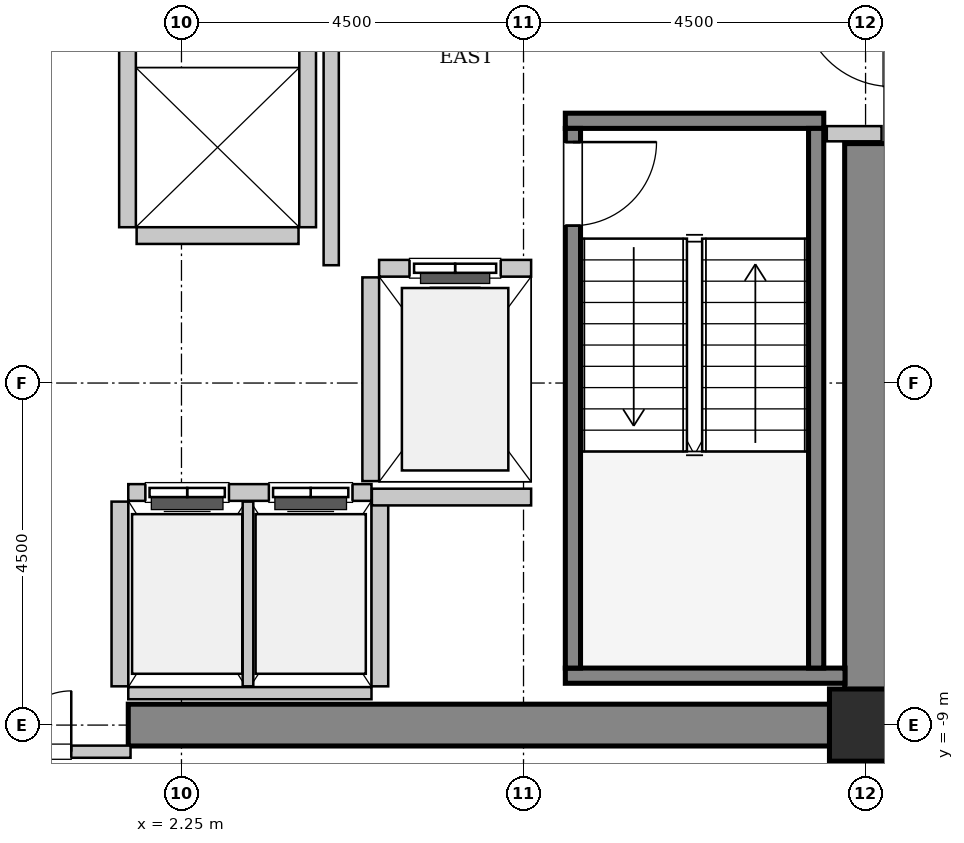
"""IFC4 building model, lengths in metres.
Left out: names, types, materials, properties, quantities, classifications, styles, units other than length and angle.
Written with IfcOpenShell. Run it as: python <this file> out.ifc"""

import sys

from ifc_helpers import new_model, si_unit, direction, frame, frame_2d, origin, origin_2d, place, context, subcontext, project, spatial, rectangle, hollow_rectangle, extrude, source, transform, mapped, element, fill, save


model = new_model("IFC4")
c1 = context("Model", 3, precision=1e-05, world=origin(), true_north=direction((0.0, 1.0)))
c2 = subcontext(c1, "Body", "Model", "MODEL_VIEW")
j1 = project(units=[si_unit("LENGTHUNIT", "METRE"), si_unit("PLANEANGLEUNIT", "RADIAN")], contexts=[c1])
p1 = place(None, origin())
s1 = spatial("IfcSite", under=j1, at=p1, CompositionType="ELEMENT")
p2 = place(p1, origin())
s2 = spatial("IfcBuilding", under=s1, at=p2, CompositionType="ELEMENT")
p3 = place(p2, frame((0.0, 0.0, 179.2)))
s3 = spatial("IfcBuildingStorey", under=s2, at=p3, CompositionType="ELEMENT", Elevation=179.2)
m1 = source(origin(), c2, "Body", "SweptSolid", [
    extrude(rectangle(XDim=9.975, YDim=0.55, at=frame_2d((4.987, 0.0))), origin(), (0.0, 0.0, 1.0), 3.8),
])
p4 = place(p3, frame((1.55, -9.0, 0.0), z_axis=(0.0, 0.0, 1.0), x_axis=(1.0, 0.0, 0.0)))
e1 = element("IfcWall", 1, at=p4, inside=s3, PredefinedType="SHEAR", context=c2, shape_type="MappedRepresentation", body=[
    mapped(m1, transform((0.0, 0.0, 0.0), x_axis=(1.0, 0.0, 0.0), y_axis=(0.0, 1.0, 0.0), z_axis=(0.0, 0.0, 1.0), scale=1.0)),
])
m2 = source(origin(), c2, "Body", "SweptSolid", [
    extrude(rectangle(XDim=7.375, YDim=0.55, at=frame_2d((3.688, 0.0))), origin(), (0.0, 0.0, 1.0), 3.8),
])
p5 = place(p3, frame((11.25, -8.725, 0.0), z_axis=(0.0, 0.0, 1.0), x_axis=(0.0, 1.0, 0.0)))
e2 = element("IfcWall", 2, at=p5, inside=s3, PredefinedType="SHEAR", context=c2, shape_type="MappedRepresentation", body=[
    mapped(m2, transform((0.0, 0.0, 0.0), x_axis=(1.0, 0.0, 0.0), y_axis=(0.0, 1.0, 0.0), z_axis=(0.0, 0.0, 1.0), scale=1.0)),
])
m3 = source(origin(), c2, "Body", "SweptSolid", [
    extrude(hollow_rectangle(XDim=0.95, YDim=0.95, WallThickness=0.045, InnerFilletRadius=0.045, OuterFilletRadius=0.09, at=origin_2d()), origin(), (0.0, 0.0, 1.0), 3.8),
])
p6 = place(p3, frame((11.25, -9.0, 0.0), z_axis=(0.0, 0.0, 1.0), x_axis=(1.0, 0.0, 0.0)))
e3 = element("IfcColumn", 3, at=p6, inside=s3, PredefinedType="COLUMN", context=c2, shape_type="MappedRepresentation", body=[
    mapped(m3, transform((0.0, 0.0, 0.0), x_axis=(1.0, 0.0, 0.0), y_axis=(0.0, 1.0, 0.0), z_axis=(0.0, 0.0, 1.0), scale=1.0)),
])
m4 = source(origin(), c2, "Body", "SweptSolid", [
    extrude(rectangle(XDim=3.4, YDim=0.2, at=frame_2d((1.7, 0.0))), origin(), (0.0, 0.0, 1.0), 3.8),
])
p7 = place(p3, frame((7.3, -1.05, 0.0), z_axis=(0.0, 0.0, 1.0), x_axis=(1.0, 0.0, 0.0)))
e4 = element("IfcWall", 4, at=p7, inside=s3, PredefinedType="SOLIDWALL", context=c2, shape_type="MappedRepresentation", body=[
    mapped(m4, transform((0.0, 0.0, 0.0), x_axis=(1.0, 0.0, 0.0), y_axis=(0.0, 1.0, 0.0), z_axis=(0.0, 0.0, 1.0), scale=1.0)),
])
m5 = source(origin(), c2, "Body", "SweptSolid", [
    extrude(rectangle(XDim=3.68, YDim=0.2, at=frame_2d((1.84, 0.0))), origin(), (0.0, 0.0, 1.0), 3.8),
])
p8 = place(p3, frame((7.3, -8.35, 0.0), z_axis=(0.0, 0.0, 1.0), x_axis=(1.0, 0.0, 0.0)))
e5 = element("IfcWall", 5, at=p8, inside=s3, PredefinedType="SOLIDWALL", context=c2, shape_type="MappedRepresentation", body=[
    mapped(m5, transform((0.0, 0.0, 0.0), x_axis=(1.0, 0.0, 0.0), y_axis=(0.0, 1.0, 0.0), z_axis=(0.0, 0.0, 1.0), scale=1.0)),
])
m6 = source(origin(), c2, "Body", "SweptSolid", [
    extrude(rectangle(XDim=7.1, YDim=0.2, at=frame_2d((3.55, 0.0))), origin(), (0.0, 0.0, 1.0), 3.8),
])
p9 = place(p3, frame((7.4, -1.15, 0.0), z_axis=(0.0, 0.0, 1.0), x_axis=(0.0, -1.0, 0.0)))
e6 = element("IfcWall", 6, at=p9, inside=s3, PredefinedType="SOLIDWALL", context=c2, shape_type="MappedRepresentation", body=[
    mapped(m6, transform((0.0, 0.0, 0.0), x_axis=(1.0, 0.0, 0.0), y_axis=(0.0, 1.0, 0.0), z_axis=(0.0, 0.0, 1.0), scale=1.0)),
])
p10 = place(p9, frame((0.18, 0.0, 0.0)))
e7 = element("IfcOpeningElement", 7, at=p10, cuts=e6, PredefinedType="OPENING", context=c2, shape_type="SweptSolid", body=[
    extrude(rectangle(XDim=1.1, YDim=2.15, at=frame_2d((0.55, 1.075))), frame((0.0, 0.11, 0.0), z_axis=(0.0, -1.0, 0.0), x_axis=(1.0, 0.0, 0.0)), (0.0, 0.0, 1.0), 0.22),
])
p11 = place(p3, frame((10.6, -1.15, 0.0), z_axis=(0.0, 0.0, 1.0), x_axis=(0.0, -1.0, 0.0)))
e8 = element("IfcWall", 8, at=p11, inside=s3, PredefinedType="SOLIDWALL", context=c2, shape_type="MappedRepresentation", body=[
    mapped(m6, transform((0.0, 0.0, 0.0), x_axis=(1.0, 0.0, 0.0), y_axis=(0.0, 1.0, 0.0), z_axis=(0.0, 0.0, 1.0), scale=1.0)),
])
m7 = source(origin(), c2, "Body", "SweptSolid", [
    extrude(rectangle(XDim=2.0, YDim=0.22, at=frame_2d((1.0, 0.0))), origin(), (0.0, 0.0, 1.0), 3.535),
])
p12 = place(p3, frame((6.85, -2.99, 0.0), z_axis=(0.0, 0.0, 1.0), x_axis=(-1.0, 0.0, 0.0)))
e9 = element("IfcWall", 9, at=p12, inside=s3, PredefinedType="SOLIDWALL", context=c2, shape_type="MappedRepresentation", body=[
    mapped(m7, transform((0.0, 0.0, 0.0), x_axis=(1.0, 0.0, 0.0), y_axis=(0.0, 1.0, 0.0), z_axis=(0.0, 0.0, 1.0), scale=1.0)),
])
p13 = place(p12, frame((0.4, 0.0, 0.0)))
e10 = element("IfcOpeningElement", 10, at=p13, cuts=e9, PredefinedType="OPENING", context=c2, shape_type="SweptSolid", body=[
    extrude(rectangle(XDim=1.2, YDim=2.2, at=frame_2d((0.6, 1.1))), frame((0.0, 0.12, 0.0), z_axis=(0.0, -1.0, 0.0), x_axis=(1.0, 0.0, 0.0)), (0.0, 0.0, 1.0), 0.24),
])
m8 = source(origin(), c2, "Body", "SweptSolid", [
    extrude(rectangle(XDim=2.68, YDim=0.22, at=frame_2d((1.34, 0.0))), origin(), (0.0, 0.0, 1.0), 3.535),
])
p14 = place(p3, frame((4.74, -3.11, 0.0), z_axis=(0.0, 0.0, 1.0), x_axis=(0.0, -1.0, 0.0)))
e11 = element("IfcWall", 11, at=p14, inside=s3, PredefinedType="SOLIDWALL", context=c2, shape_type="MappedRepresentation", body=[
    mapped(m8, transform((0.0, 0.0, 0.0), x_axis=(1.0, 0.0, 0.0), y_axis=(0.0, 1.0, 0.0), z_axis=(0.0, 0.0, 1.0), scale=1.0)),
])
m9 = source(origin(), c2, "Body", "SweptSolid", [
    extrude(rectangle(XDim=3.2, YDim=0.22, at=frame_2d((1.6, 0.0))), origin(), (0.0, 0.0, 1.0), 3.535),
])
p15 = place(p3, frame((4.75, -5.94, 0.0), z_axis=(0.0, 0.0, 1.0), x_axis=(-1.0, 0.0, 0.0)))
e12 = element("IfcWall", 12, at=p15, inside=s3, PredefinedType="SOLIDWALL", context=c2, shape_type="MappedRepresentation", body=[
    mapped(m9, transform((0.0, 0.0, 0.0), x_axis=(1.0, 0.0, 0.0), y_axis=(0.0, 1.0, 0.0), z_axis=(0.0, 0.0, 1.0), scale=1.0)),
])
p16 = place(p15, frame((1.875, 0.0, 0.0)))
e13 = element("IfcOpeningElement", 13, at=p16, cuts=e12, PredefinedType="OPENING", context=c2, shape_type="SweptSolid", body=[
    extrude(rectangle(XDim=1.1, YDim=2.2, at=frame_2d((0.55, 1.1))), frame((0.0, 0.12, 0.0), z_axis=(0.0, -1.0, 0.0), x_axis=(1.0, 0.0, 0.0)), (0.0, 0.0, 1.0), 0.24),
])
p17 = place(p15, frame((0.25, 0.0, 0.0)))
e14 = element("IfcOpeningElement", 14, at=p17, cuts=e12, PredefinedType="OPENING", context=c2, shape_type="SweptSolid", body=[
    extrude(rectangle(XDim=1.1, YDim=2.2, at=frame_2d((0.55, 1.1))), frame((0.0, 0.12, 0.0), z_axis=(0.0, -1.0, 0.0), x_axis=(1.0, 0.0, 0.0)), (0.0, 0.0, 1.0), 0.24),
])
m10 = source(origin(), c2, "Body", "SweptSolid", [
    extrude(rectangle(XDim=3.2, YDim=0.16, at=frame_2d((1.6, 0.0))), origin(), (0.0, 0.0, 1.0), 2.425),
])
p18 = place(p3, frame((1.55, -8.58, 0.0), z_axis=(0.0, 0.0, 1.0), x_axis=(1.0, 0.0, 0.0)))
e15 = element("IfcWall", 15, at=p18, inside=s3, PredefinedType="PARTITIONING", context=c2, shape_type="MappedRepresentation", body=[
    mapped(m10, transform((0.0, 0.0, 0.0), x_axis=(1.0, 0.0, 0.0), y_axis=(0.0, 1.0, 0.0), z_axis=(0.0, 0.0, 1.0), scale=1.0)),
])
m11 = source(origin(), c2, "Body", "SweptSolid", [
    extrude(rectangle(XDim=2.43, YDim=0.22, at=frame_2d((1.215, 0.0))), origin(), (0.0, 0.0, 1.0), 3.535),
])
p19 = place(p3, frame((1.44, -6.06, 0.0), z_axis=(0.0, 0.0, 1.0), x_axis=(0.0, -1.0, 0.0)))
e16 = element("IfcWall", 16, at=p19, inside=s3, PredefinedType="SOLIDWALL", context=c2, shape_type="MappedRepresentation", body=[
    mapped(m11, transform((0.0, 0.0, 0.0), x_axis=(1.0, 0.0, 0.0), y_axis=(0.0, 1.0, 0.0), z_axis=(0.0, 0.0, 1.0), scale=1.0)),
])
m12 = source(origin(), c2, "Body", "SweptSolid", [
    extrude(rectangle(XDim=2.43, YDim=0.14, at=frame_2d((1.215, 0.0))), origin(), (0.0, 0.0, 1.0), 3.535),
])
p20 = place(p3, frame((3.125, -8.49, 0.0), z_axis=(0.0, 0.0, 1.0), x_axis=(0.0, 1.0, 0.0)))
e17 = element("IfcWall", 17, at=p20, inside=s3, PredefinedType="PARTITIONING", context=c2, shape_type="MappedRepresentation", body=[
    mapped(m12, transform((0.0, 0.0, 0.0), x_axis=(1.0, 0.0, 0.0), y_axis=(0.0, 1.0, 0.0), z_axis=(0.0, 0.0, 1.0), scale=1.0)),
])
p21 = place(p3, frame((4.86, -8.49, 0.0), z_axis=(0.0, 0.0, 1.0), x_axis=(0.0, 1.0, 0.0)))
e18 = element("IfcWall", 18, at=p21, inside=s3, PredefinedType="SOLIDWALL", context=c2, shape_type="MappedRepresentation", body=[
    mapped(m11, transform((0.0, 0.0, 0.0), x_axis=(1.0, 0.0, 0.0), y_axis=(0.0, 1.0, 0.0), z_axis=(0.0, 0.0, 1.0), scale=1.0)),
])
m13 = source(origin(), c2, "Body", "SweptSolid", [
    extrude(rectangle(XDim=4.9, YDim=0.22, at=frame_2d((2.45, 0.0))), origin(), (0.0, 0.0, 1.0), 3.535),
])
for number, where, z_axis, x_axis in (
    (19, (1.54, 2.45, 0.0), (0.0, 0.0, 1.0), (0.0, -1.0, 0.0)),
    (20, (3.91, -2.45, 0.0), (0.0, 0.0, 1.0), (0.0, 1.0, 0.0)),
):
    element("IfcWall", number, at=place(p3, frame(where, z_axis=z_axis, x_axis=x_axis)), inside=s3, PredefinedType="SOLIDWALL", context=c2, shape_type="MappedRepresentation", body=[
        mapped(m13, transform((0.0, 0.0, 0.0), x_axis=(1.0, 0.0, 0.0), y_axis=(0.0, 1.0, 0.0), z_axis=(0.0, 0.0, 1.0), scale=1.0)),
    ])
m14 = source(origin(), c2, "Body", "SweptSolid", [
    extrude(rectangle(XDim=2.13, YDim=0.22, at=frame_2d((1.065, 0.0))), origin(), (0.0, 0.0, 1.0), 3.535),
])
p22 = place(p3, frame((1.66, -2.56, 0.0), z_axis=(0.0, 0.0, 1.0), x_axis=(1.0, 0.0, 0.0)))
e21 = element("IfcWall", 21, at=p22, inside=s3, PredefinedType="SOLIDWALL", context=c2, shape_type="MappedRepresentation", body=[
    mapped(m14, transform((0.0, 0.0, 0.0), x_axis=(1.0, 0.0, 0.0), y_axis=(0.0, 1.0, 0.0), z_axis=(0.0, 0.0, 1.0), scale=1.0)),
])
m15 = source(origin(), c2, "Body", "SweptSolid", [
    extrude(rectangle(XDim=2.095, YDim=0.22, at=frame_2d((1.048, 0.0))), origin(), (0.0, 0.0, 1.0), 3.535),
])
p23 = place(p3, frame((4.755, -6.0, 0.0), z_axis=(0.0, 0.0, 1.0), x_axis=(1.0, 0.0, 0.0)))
e22 = element("IfcWall", 22, at=p23, inside=s3, PredefinedType="SOLIDWALL", context=c2, shape_type="MappedRepresentation", body=[
    mapped(m15, transform((0.0, 0.0, 0.0), x_axis=(1.0, 0.0, 0.0), y_axis=(0.0, 1.0, 0.0), z_axis=(0.0, 0.0, 1.0), scale=1.0)),
])
m16 = source(origin(), c2, "Body", "SweptSolid", [
    extrude(rectangle(XDim=5.9, YDim=0.2, at=frame_2d((2.95, 0.0))), origin(), (0.0, 0.0, 1.0), 3.535),
])
p24 = place(p3, frame((4.22, -2.95, 0.0), z_axis=(0.0, 0.0, 1.0), x_axis=(0.0, 1.0, 0.0)))
e23 = element("IfcWall", 23, at=p24, inside=s3, PredefinedType="PARTITIONING", context=c2, shape_type="MappedRepresentation", body=[
    mapped(m16, transform((0.0, 0.0, 0.0), x_axis=(1.0, 0.0, 0.0), y_axis=(0.0, 1.0, 0.0), z_axis=(0.0, 0.0, 1.0), scale=1.0)),
])
m17 = source(origin(), c2, "Body", "SweptSolid", [
    extrude(rectangle(XDim=0.72, YDim=0.2, at=frame_2d((0.36, 0.0))), origin(), (0.0, 0.0, 1.0), 3.535),
])
p25 = place(p3, frame((10.74, -1.22, 0.0), z_axis=(0.0, 0.0, 1.0), x_axis=(1.0, 0.0, 0.0)))
e24 = element("IfcWall", 24, at=p25, inside=s3, PredefinedType="PARTITIONING", context=c2, shape_type="MappedRepresentation", body=[
    mapped(m17, transform((0.0, 0.0, 0.0), x_axis=(1.0, 0.0, 0.0), y_axis=(0.0, 1.0, 0.0), z_axis=(0.0, 0.0, 1.0), scale=1.0)),
])
m18 = source(origin(), c2, "Body", "SweptSolid", [
    extrude(rectangle(XDim=3.16, YDim=0.16, at=frame_2d((1.58, 0.0))), origin(), (0.0, 0.0, 1.0), 2.425),
])
p26 = place(p3, frame((-1.58, -9.35, 0.0), z_axis=(0.0, 0.0, 1.0), x_axis=(1.0, 0.0, 0.0)))
e25 = element("IfcWall", 25, at=p26, inside=s3, PredefinedType="PARTITIONING", context=c2, shape_type="MappedRepresentation", body=[
    mapped(m18, transform((0.0, 0.0, 0.0), x_axis=(1.0, 0.0, 0.0), y_axis=(0.0, 1.0, 0.0), z_axis=(0.0, 0.0, 1.0), scale=1.0)),
])
p27 = place(p26, frame((0.78, 0.0, 0.0)))
e26 = element("IfcOpeningElement", 26, at=p27, cuts=e25, PredefinedType="OPENING", context=c2, shape_type="SweptSolid", body=[
    extrude(rectangle(XDim=1.6, YDim=2.3, at=frame_2d((0.8, 1.15))), frame((0.0, 0.09, 0.0), z_axis=(0.0, -1.0, 0.0), x_axis=(1.0, 0.0, 0.0)), (0.0, 0.0, 1.0), 0.18),
])
m19 = source(origin(), c2, "Body", "SweptSolid", [
    extrude(rectangle(XDim=1.1, YDim=2.15, at=frame_2d((0.55, 1.075))), frame((0.0, 0.025, 0.0), z_axis=(0.0, -1.0, 0.0), x_axis=(1.0, 0.0, 0.0)), (0.0, 0.0, 1.0), 0.05),
])
p28 = place(p10, origin())
e27 = element("IfcDoor", 27, at=p28, inside=s3, OperationType="SINGLE_SWING_LEFT", PredefinedType="DOOR", context=c2, shape_type="MappedRepresentation", body=[
    mapped(m19, transform((0.0, 0.0, 0.0), x_axis=(1.0, 0.0, 0.0), y_axis=(0.0, 1.0, 0.0), z_axis=(0.0, 0.0, 1.0), scale=1.0)),
])
fill(e7, e27)
m20 = source(origin(), c2, "Body", "SweptSolid", [
    extrude(rectangle(XDim=1.2, YDim=2.2, at=frame_2d((0.6, 1.1))), frame((0.0, 0.025, 0.0), z_axis=(0.0, -1.0, 0.0), x_axis=(1.0, 0.0, 0.0)), (0.0, 0.0, 1.0), 0.05),
])
p29 = place(p13, origin())
e28 = element("IfcDoor", 28, at=p29, inside=s3, OperationType="SLIDING_TO_LEFT", PredefinedType="DOOR", context=c2, shape_type="MappedRepresentation", body=[
    mapped(m20, transform((0.0, 0.0, 0.0), x_axis=(1.0, 0.0, 0.0), y_axis=(0.0, 1.0, 0.0), z_axis=(0.0, 0.0, 1.0), scale=1.0)),
])
fill(e10, e28)
m21 = source(origin(), c2, "Body", "SweptSolid", [
    extrude(rectangle(XDim=1.1, YDim=2.2, at=frame_2d((0.55, 1.1))), frame((0.0, 0.025, 0.0), z_axis=(0.0, -1.0, 0.0), x_axis=(1.0, 0.0, 0.0)), (0.0, 0.0, 1.0), 0.05),
])
p30 = place(p16, origin())
e29 = element("IfcDoor", 29, at=p30, inside=s3, OperationType="DOUBLE_DOOR_SLIDING", PredefinedType="DOOR", context=c2, shape_type="MappedRepresentation", body=[
    mapped(m21, transform((0.0, 0.0, 0.0), x_axis=(1.0, 0.0, 0.0), y_axis=(0.0, 1.0, 0.0), z_axis=(0.0, 0.0, 1.0), scale=1.0)),
])
fill(e13, e29)
p31 = place(p17, origin())
e30 = element("IfcDoor", 30, at=p31, inside=s3, OperationType="DOUBLE_DOOR_SLIDING", PredefinedType="DOOR", context=c2, shape_type="MappedRepresentation", body=[
    mapped(m21, transform((0.0, 0.0, 0.0), x_axis=(1.0, 0.0, 0.0), y_axis=(0.0, 1.0, 0.0), z_axis=(0.0, 0.0, 1.0), scale=1.0)),
])
fill(e14, e30)
m22 = source(origin(), c2, "Body", "SweptSolid", [
    extrude(rectangle(XDim=1.6, YDim=2.3, at=frame_2d((0.8, 1.15))), frame((0.0, 0.025, 0.0), z_axis=(0.0, -1.0, 0.0), x_axis=(1.0, 0.0, 0.0)), (0.0, 0.0, 1.0), 0.05),
])
p32 = place(p27, origin())
e31 = element("IfcDoor", 31, at=p32, inside=s3, OperationType="DOUBLE_DOOR_SINGLE_SWING", PredefinedType="DOOR", context=c2, shape_type="MappedRepresentation", body=[
    mapped(m22, transform((0.0, 0.0, 0.0), x_axis=(1.0, 0.0, 0.0), y_axis=(0.0, 1.0, 0.0), z_axis=(0.0, 0.0, 1.0), scale=1.0)),
])
fill(e26, e31)
save(model, sys.argv[1])
